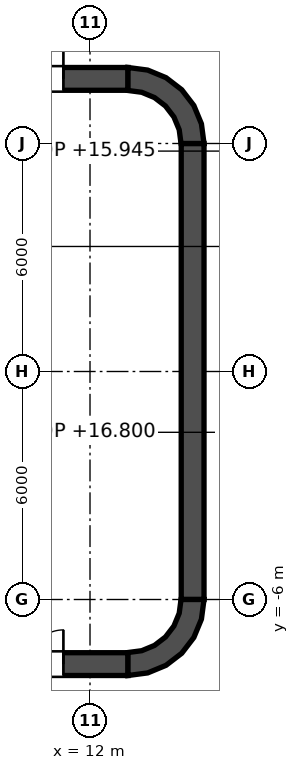
"""IFC4 building model, lengths in metres.
Left out: names, types, materials, properties, quantities, classifications, styles, units other than length and angle.
Written with IfcOpenShell. Run it as: python <this file> out.ifc"""

import sys

from ifc_helpers import new_model, si_unit, direction, frame, frame_2d, origin, place, context, subcontext, project, spatial, polyline, rectangle, outline, extrude, element, fill, save


model = new_model("IFC4")
c1 = context("Model", 3, precision=1e-05, world=origin(), true_north=direction((0.0, 1.0)))
c2 = subcontext(c1, "Body", "Model", "MODEL_VIEW")
j1 = project(units=[si_unit("LENGTHUNIT", "METRE"), si_unit("PLANEANGLEUNIT", "RADIAN")], contexts=[c1])
p1 = place(None, origin())
s1 = spatial("IfcSite", under=j1, at=p1, CompositionType="ELEMENT")
p2 = place(p1, origin())
s2 = spatial("IfcBuilding", under=s1, at=p2, CompositionType="ELEMENT")
p3 = place(p2, frame((0.0, 0.0, 8.0)))
s3 = spatial("IfcBuildingStorey", under=s2, at=p3, CompositionType="ELEMENT", Elevation=8.0)
p4 = place(p3, frame((-13.0, 7.7, 0.0), z_axis=(0.0, 0.0, 1.0), x_axis=(1.0, 0.0, 0.0)))
e1 = element("IfcWall", 1, at=p4, inside=s3, PredefinedType="SHEAR", context=c2, shape_type="SweptSolid", body=[
    extrude(rectangle(XDim=26.0, YDim=0.6, at=frame_2d((13.0, 0.0))), origin(), (0.0, 0.0, 1.0), 9.0),
])
p5 = place(p4, frame((1.7, 0.0, 0.0)))
e2 = element("IfcOpeningElement", 2, at=p5, cuts=e1, PredefinedType="OPENING", context=c2, shape_type="SweptSolid", body=[
    extrude(rectangle(XDim=1.8, YDim=2.1, at=frame_2d((0.9, 1.05))), frame((0.0, 0.3, 0.0), z_axis=(0.0, -1.0, 0.0), x_axis=(1.0, 0.0, 0.0)), (0.0, 0.0, 1.0), 0.6),
])
p6 = place(p4, frame((22.5, 0.0, 0.0)))
e3 = element("IfcOpeningElement", 3, at=p6, cuts=e1, PredefinedType="OPENING", context=c2, shape_type="SweptSolid", body=[
    extrude(rectangle(XDim=1.8, YDim=2.1, at=frame_2d((0.9, 1.05))), frame((0.0, 0.3, 0.0), z_axis=(0.0, -1.0, 0.0), x_axis=(1.0, 0.0, 0.0)), (0.0, 0.0, 1.0), 0.6),
])
p7 = place(p3, frame((-13.0, -7.7, 0.0), z_axis=(0.0, 0.0, 1.0), x_axis=(1.0, 0.0, 0.0)))
e4 = element("IfcWall", 4, at=p7, inside=s3, PredefinedType="SHEAR", context=c2, shape_type="SweptSolid", body=[
    extrude(rectangle(XDim=26.0, YDim=0.6, at=frame_2d((13.0, 0.0))), origin(), (0.0, 0.0, 1.0), 9.0),
])
p8 = place(p7, frame((1.7, 0.0, 0.0)))
e5 = element("IfcOpeningElement", 5, at=p8, cuts=e4, PredefinedType="OPENING", context=c2, shape_type="SweptSolid", body=[
    extrude(rectangle(XDim=1.8, YDim=2.1, at=frame_2d((0.9, 1.05))), frame((0.0, 0.3, 0.0), z_axis=(0.0, -1.0, 0.0), x_axis=(1.0, 0.0, 0.0)), (0.0, 0.0, 1.0), 0.6),
])
p9 = place(p7, frame((22.5, 0.0, 0.0)))
e6 = element("IfcOpeningElement", 6, at=p9, cuts=e4, PredefinedType="OPENING", context=c2, shape_type="SweptSolid", body=[
    extrude(rectangle(XDim=1.8, YDim=2.1, at=frame_2d((0.9, 1.05))), frame((0.0, 0.3, 0.0), z_axis=(0.0, -1.0, 0.0), x_axis=(1.0, 0.0, 0.0)), (0.0, 0.0, 1.0), 0.6),
])
p10 = place(p3, frame((14.7, -6.0, 0.0), z_axis=(0.0, 0.0, 1.0), x_axis=(0.0, 1.0, 0.0)))
e7 = element("IfcWall", 7, at=p10, inside=s3, PredefinedType="SHEAR", context=c2, shape_type="SweptSolid", body=[
    extrude(rectangle(XDim=12.0, YDim=0.6, at=frame_2d((6.0, 0.0))), origin(), (0.0, 0.0, 1.0), 9.0),
])
p11 = place(p3, origin())
e8 = element("IfcWall", 8, at=p11, inside=s3, PredefinedType="SHEAR", context=c2, shape_type="SweptSolid", body=[
    extrude(outline(polyline([(13.0, 8.0), (13.0, 7.395), (13.361, 7.347), (13.698, 7.208), (13.986, 6.986), (14.208, 6.698), (14.347, 6.361), (14.395, 6.0), (15.0, 6.0), (14.932, 6.518), (14.732, 7.0), (14.414, 7.414), (14.0, 7.732), (13.518, 7.932), (13.0, 8.0)])), origin(), (0.0, 0.0, 1.0), 9.0),
])
e9 = element("IfcWall", 9, at=p11, inside=s3, PredefinedType="SHEAR", context=c2, shape_type="SweptSolid", body=[
    extrude(outline(polyline([(15.0, -6.0), (14.395, -6.0), (14.347, -6.361), (14.208, -6.698), (13.986, -6.986), (13.698, -7.208), (13.361, -7.347), (13.0, -7.395), (13.0, -8.0), (13.518, -7.932), (14.0, -7.732), (14.414, -7.414), (14.732, -7.0), (14.932, -6.518), (15.0, -6.0)])), origin(), (0.0, 0.0, 1.0), 9.0),
])
p12 = place(p3, frame((11.8, -7.4, 0.0), z_axis=(0.0, 0.0, 1.0), x_axis=(0.0, 1.0, 0.0)))
e10 = element("IfcWall", 10, at=p12, inside=s3, PredefinedType="SOLIDWALL", context=c2, shape_type="SweptSolid", body=[
    extrude(rectangle(XDim=14.8, YDim=0.4, at=frame_2d((7.4, 0.0))), origin(), (0.0, 0.0, 1.0), 8.8),
])
p13 = place(p12, frame((11.2, 0.0, 0.0)))
e11 = element("IfcOpeningElement", 11, at=p13, cuts=e10, PredefinedType="OPENING", context=c2, shape_type="SweptSolid", body=[
    extrude(rectangle(XDim=1.1, YDim=2.1, at=frame_2d((0.55, 1.05))), frame((0.0, 0.2, 0.0), z_axis=(0.0, -1.0, 0.0), x_axis=(1.0, 0.0, 0.0)), (0.0, 0.0, 1.0), 0.4),
])
p14 = place(p12, frame((8.3, 0.0, 0.0)))
e12 = element("IfcOpeningElement", 12, at=p14, cuts=e10, PredefinedType="OPENING", context=c2, shape_type="SweptSolid", body=[
    extrude(rectangle(XDim=1.1, YDim=2.1, at=frame_2d((0.55, 1.05))), frame((0.0, 0.2, 0.0), z_axis=(0.0, -1.0, 0.0), x_axis=(1.0, 0.0, 0.0)), (0.0, 0.0, 1.0), 0.4),
])
p15 = place(p12, frame((5.4, 0.0, 0.0)))
e13 = element("IfcOpeningElement", 13, at=p15, cuts=e10, PredefinedType="OPENING", context=c2, shape_type="SweptSolid", body=[
    extrude(rectangle(XDim=1.1, YDim=2.1, at=frame_2d((0.55, 1.05))), frame((0.0, 0.2, 0.0), z_axis=(0.0, -1.0, 0.0), x_axis=(1.0, 0.0, 0.0)), (0.0, 0.0, 1.0), 0.4),
])
p16 = place(p12, frame((13.552, 0.0, 0.0)))
e14 = element("IfcOpeningElement", 14, at=p16, cuts=e10, PredefinedType="OPENING", context=c2, shape_type="SweptSolid", body=[
    extrude(rectangle(XDim=0.9, YDim=2.1, at=frame_2d((0.45, 1.05))), frame((0.0, 0.2, 0.0), z_axis=(0.0, -1.0, 0.0), x_axis=(1.0, 0.0, 0.0)), (0.0, 0.0, 1.0), 0.4),
])
p17 = place(p12, frame((0.347, 0.0, 0.0)))
e15 = element("IfcOpeningElement", 15, at=p17, cuts=e10, PredefinedType="OPENING", context=c2, shape_type="SweptSolid", body=[
    extrude(rectangle(XDim=0.9, YDim=2.1, at=frame_2d((0.45, 1.05))), frame((0.0, 0.2, 0.0), z_axis=(0.0, -1.0, 0.0), x_axis=(1.0, 0.0, 0.0)), (0.0, 0.0, 1.0), 0.4),
])
e16 = element("IfcWall", 16, at=p11, inside=s3, PredefinedType="SOLIDWALL", context=c2, shape_type="SweptSolid", body=[
    extrude(outline(polyline([(12.0, -5.675), (12.0, -5.925), (14.15, -5.925), (14.4, -5.925), (14.4, -5.675), (14.4, -3.025), (14.4, -2.775), (14.4, -0.125), (14.4, 0.125), (14.4, 2.775), (14.4, 3.025), (14.4, 5.675), (14.4, 5.925), (14.15, 5.925), (12.0, 5.925), (12.0, 5.675), (14.15, 5.675), (14.15, 3.025), (12.0, 3.025), (12.0, 2.775), (14.15, 2.775), (14.15, 0.125), (12.0, 0.125), (12.0, -0.125), (14.15, -0.125), (14.15, -2.775), (12.0, -2.775), (12.0, -3.025), (14.15, -3.025), (14.15, -5.675), (12.0, -5.675)])), origin(), (0.0, 0.0, 1.0), 8.8),
])
p18 = place(p13, origin())
e17 = element("IfcDoor", 17, at=p18, inside=s3, OperationType="DOUBLE_DOOR_SLIDING", PredefinedType="DOOR", context=c2, shape_type="SweptSolid", body=[
    extrude(rectangle(XDim=1.1, YDim=2.1, at=frame_2d((0.55, 1.05))), frame((0.0, 0.025, 0.0), z_axis=(0.0, -1.0, 0.0), x_axis=(1.0, 0.0, 0.0)), (0.0, 0.0, 1.0), 0.05),
])
fill(e11, e17)
p19 = place(p14, origin())
e18 = element("IfcDoor", 18, at=p19, inside=s3, OperationType="DOUBLE_DOOR_SLIDING", PredefinedType="DOOR", context=c2, shape_type="SweptSolid", body=[
    extrude(rectangle(XDim=1.1, YDim=2.1, at=frame_2d((0.55, 1.05))), frame((0.0, 0.025, 0.0), z_axis=(0.0, -1.0, 0.0), x_axis=(1.0, 0.0, 0.0)), (0.0, 0.0, 1.0), 0.05),
])
fill(e12, e18)
p20 = place(p15, origin())
e19 = element("IfcDoor", 19, at=p20, inside=s3, OperationType="DOUBLE_DOOR_SLIDING", PredefinedType="DOOR", context=c2, shape_type="SweptSolid", body=[
    extrude(rectangle(XDim=1.1, YDim=2.1, at=frame_2d((0.55, 1.05))), frame((0.0, 0.025, 0.0), z_axis=(0.0, -1.0, 0.0), x_axis=(1.0, 0.0, 0.0)), (0.0, 0.0, 1.0), 0.05),
])
fill(e13, e19)
p21 = place(p16, origin())
e20 = element("IfcDoor", 20, at=p21, inside=s3, OperationType="SINGLE_SWING_RIGHT", PredefinedType="DOOR", context=c2, shape_type="SweptSolid", body=[
    extrude(rectangle(XDim=0.9, YDim=2.1, at=frame_2d((0.45, 1.05))), frame((0.0, 0.025, 0.0), z_axis=(0.0, -1.0, 0.0), x_axis=(1.0, 0.0, 0.0)), (0.0, 0.0, 1.0), 0.05),
])
fill(e14, e20)
p22 = place(p17, origin())
e21 = element("IfcDoor", 21, at=p22, inside=s3, OperationType="SINGLE_SWING_RIGHT", PredefinedType="DOOR", context=c2, shape_type="SweptSolid", body=[
    extrude(rectangle(XDim=0.9, YDim=2.1, at=frame_2d((0.45, 1.05))), frame((0.0, 0.025, 0.0), z_axis=(0.0, -1.0, 0.0), x_axis=(1.0, 0.0, 0.0)), (0.0, 0.0, 1.0), 0.05),
])
fill(e15, e21)
p23 = place(p6, origin())
e22 = element("IfcDoor", 22, at=p23, inside=s3, OperationType="DOUBLE_DOOR_SINGLE_SWING", PredefinedType="DOOR", context=c2, shape_type="SweptSolid", body=[
    extrude(rectangle(XDim=1.8, YDim=2.1, at=frame_2d((0.9, 1.05))), frame((0.0, 0.025, 0.0), z_axis=(0.0, -1.0, 0.0), x_axis=(1.0, 0.0, 0.0)), (0.0, 0.0, 1.0), 0.05),
])
fill(e3, e22)
p24 = place(p9, origin())
e23 = element("IfcDoor", 23, at=p24, inside=s3, OperationType="DOUBLE_DOOR_SINGLE_SWING", PredefinedType="DOOR", context=c2, shape_type="SweptSolid", body=[
    extrude(rectangle(XDim=1.8, YDim=2.1, at=frame_2d((0.9, 1.05))), frame((0.0, 0.025, 0.0), z_axis=(0.0, -1.0, 0.0), x_axis=(1.0, 0.0, 0.0)), (0.0, 0.0, 1.0), 0.05),
])
fill(e6, e23)
save(model, sys.argv[1])
